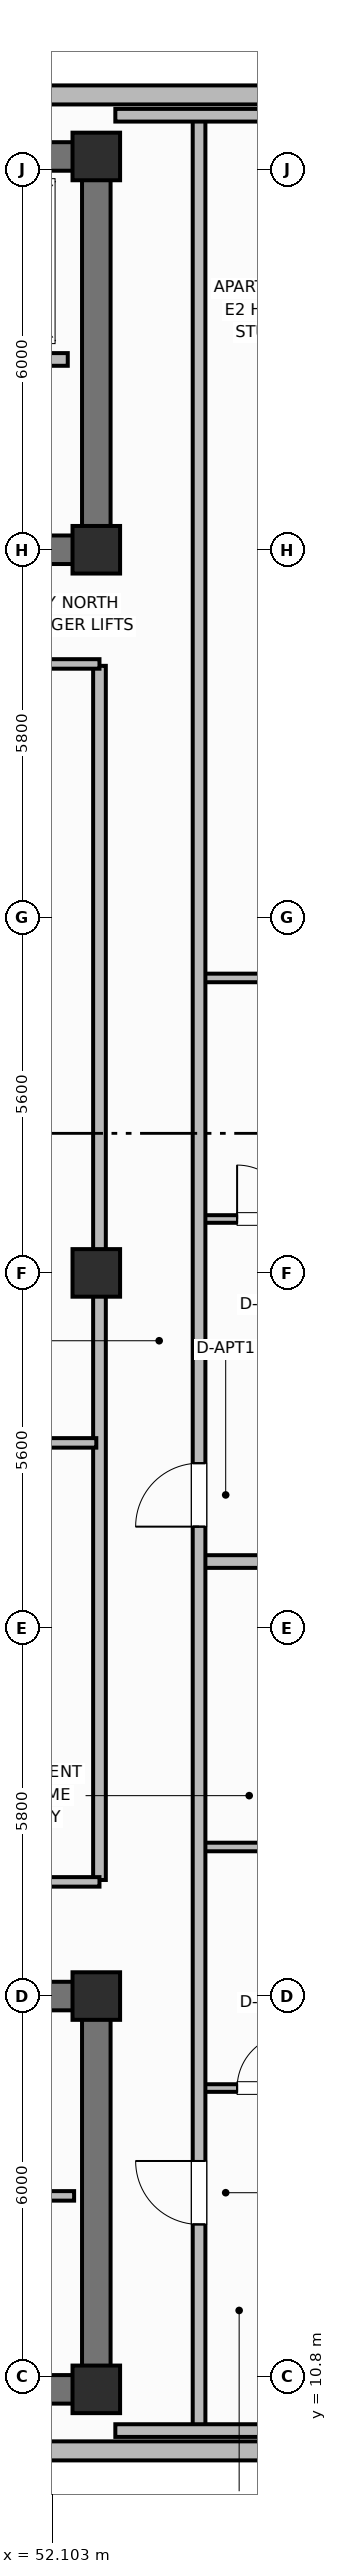
"""IFC4 building model, lengths in metres.
Left out: names, types, materials, properties, quantities, classifications, styles, units other than length and angle.
Written with IfcOpenShell. Run it as: python <this file> out.ifc"""

import sys

from ifc_helpers import new_model, si_unit, direction, frame, frame_2d, origin, origin_2d, place, context, subcontext, project, spatial, rectangle, extrude, element, fill, save


model = new_model("IFC4")
c1 = context("Model", 3, precision=1e-05, world=origin(), true_north=direction((0.0, 1.0)))
c2 = subcontext(c1, "Body", "Model", "MODEL_VIEW")
j1 = project(units=[si_unit("LENGTHUNIT", "METRE"), si_unit("PLANEANGLEUNIT", "RADIAN")], contexts=[c1])
p1 = place(None, origin())
s1 = spatial("IfcSite", under=j1, at=p1, CompositionType="ELEMENT")
p2 = place(p1, origin())
s2 = spatial("IfcBuilding", under=s1, at=p2, CompositionType="ELEMENT")
p3 = place(p2, frame((0.0, 0.0, 289.8)))
s3 = spatial("IfcBuildingStorey", under=s2, at=p3, CompositionType="ELEMENT", Elevation=289.8)
p4 = place(p3, frame((52.8, 10.6, 0.0), z_axis=(0.0, 0.0, 1.0), x_axis=(-1.0, 0.0, 0.0)))
e1 = element("IfcWall", 1, at=p4, inside=s3, PredefinedType="SHEAR", context=c2, shape_type="SweptSolid", body=[
    extrude(rectangle(XDim=27.2, YDim=0.45, at=frame_2d((13.6, 0.0))), origin(), (0.0, 0.0, 1.0), 3.7),
])
p5 = place(p3, frame((52.8, 10.825, 0.0), z_axis=(0.0, 0.0, 1.0), x_axis=(0.0, 1.0, 0.0)))
e2 = element("IfcWall", 2, at=p5, inside=s3, PredefinedType="SHEAR", context=c2, shape_type="SweptSolid", body=[
    extrude(rectangle(XDim=5.75, YDim=0.45, at=frame_2d((2.875, 0.0))), origin(), (0.0, 0.0, 1.0), 3.7),
])
p6 = place(p3, frame((25.6, 16.8, 0.0), z_axis=(0.0, 0.0, 1.0), x_axis=(1.0, 0.0, 0.0)))
e3 = element("IfcWall", 3, at=p6, inside=s3, PredefinedType="SHEAR", context=c2, shape_type="SweptSolid", body=[
    extrude(rectangle(XDim=27.2, YDim=0.45, at=frame_2d((13.6, 0.0))), origin(), (0.0, 0.0, 1.0), 3.7),
])
p7 = place(p6, frame((1.7, 0.0, 0.0)))
e4 = element("IfcOpeningElement", 4, at=p7, cuts=e3, PredefinedType="OPENING", context=c2, shape_type="SweptSolid", body=[
    extrude(rectangle(XDim=1.1, YDim=2.15, at=frame_2d((0.55, 1.075))), frame((0.0, 0.235, 0.0), z_axis=(0.0, -1.0, 0.0), x_axis=(1.0, 0.0, 0.0)), (0.0, 0.0, 1.0), 0.47),
])
p8 = place(p6, frame((4.45, 0.0, 0.0)))
e5 = element("IfcOpeningElement", 5, at=p8, cuts=e3, PredefinedType="OPENING", context=c2, shape_type="SweptSolid", body=[
    extrude(rectangle(XDim=0.85, YDim=2.1, at=frame_2d((0.425, 1.05))), frame((0.0, 0.235, 0.0), z_axis=(0.0, -1.0, 0.0), x_axis=(1.0, 0.0, 0.0)), (0.0, 0.0, 1.0), 0.47),
])
p9 = place(p6, frame((6.5, 0.0, 0.0)))
e6 = element("IfcOpeningElement", 6, at=p9, cuts=e3, PredefinedType="OPENING", context=c2, shape_type="SweptSolid", body=[
    extrude(rectangle(XDim=0.85, YDim=2.1, at=frame_2d((0.425, 1.05))), frame((0.0, 0.235, 0.0), z_axis=(0.0, -1.0, 0.0), x_axis=(1.0, 0.0, 0.0)), (0.0, 0.0, 1.0), 0.47),
])
p10 = place(p6, frame((13.0, 0.0, 0.0)))
e7 = element("IfcOpeningElement", 7, at=p10, cuts=e3, PredefinedType="OPENING", context=c2, shape_type="SweptSolid", body=[
    extrude(rectangle(XDim=1.2, YDim=2.15, at=frame_2d((0.6, 1.075))), frame((0.0, 0.235, 0.0), z_axis=(0.0, -1.0, 0.0), x_axis=(1.0, 0.0, 0.0)), (0.0, 0.0, 1.0), 0.47),
])
p11 = place(p6, frame((19.8, 0.0, 0.0)))
e8 = element("IfcOpeningElement", 8, at=p11, cuts=e3, PredefinedType="OPENING", context=c2, shape_type="SweptSolid", body=[
    extrude(rectangle(XDim=0.85, YDim=2.1, at=frame_2d((0.425, 1.05))), frame((0.0, 0.235, 0.0), z_axis=(0.0, -1.0, 0.0), x_axis=(1.0, 0.0, 0.0)), (0.0, 0.0, 1.0), 0.47),
])
p12 = place(p6, frame((24.2, 0.0, 0.0)))
e9 = element("IfcOpeningElement", 9, at=p12, cuts=e3, PredefinedType="OPENING", context=c2, shape_type="SweptSolid", body=[
    extrude(rectangle(XDim=0.85, YDim=2.1, at=frame_2d((0.425, 1.05))), frame((0.0, 0.235, 0.0), z_axis=(0.0, -1.0, 0.0), x_axis=(1.0, 0.0, 0.0)), (0.0, 0.0, 1.0), 0.47),
])
p13 = place(p3, frame((25.6, 45.8, 0.0), z_axis=(0.0, 0.0, 1.0), x_axis=(1.0, 0.0, 0.0)))
e10 = element("IfcWall", 10, at=p13, inside=s3, PredefinedType="SHEAR", context=c2, shape_type="SweptSolid", body=[
    extrude(rectangle(XDim=27.2, YDim=0.45, at=frame_2d((13.6, 0.0))), origin(), (0.0, 0.0, 1.0), 3.7),
])
p14 = place(p3, frame((52.8, 39.825, 0.0), z_axis=(0.0, 0.0, 1.0), x_axis=(0.0, 1.0, 0.0)))
e11 = element("IfcWall", 11, at=p14, inside=s3, PredefinedType="SHEAR", context=c2, shape_type="SweptSolid", body=[
    extrude(rectangle(XDim=5.75, YDim=0.45, at=frame_2d((2.875, 0.0))), origin(), (0.0, 0.0, 1.0), 3.7),
])
p15 = place(p3, frame((52.8, 39.6, 0.0), z_axis=(0.0, 0.0, 1.0), x_axis=(-1.0, 0.0, 0.0)))
e12 = element("IfcWall", 12, at=p15, inside=s3, PredefinedType="SHEAR", context=c2, shape_type="SweptSolid", body=[
    extrude(rectangle(XDim=27.2, YDim=0.45, at=frame_2d((13.6, 0.0))), origin(), (0.0, 0.0, 1.0), 3.7),
])
p16 = place(p15, frame((24.3, 0.0, 0.0)))
e13 = element("IfcOpeningElement", 13, at=p16, cuts=e12, PredefinedType="OPENING", context=c2, shape_type="SweptSolid", body=[
    extrude(rectangle(XDim=1.1, YDim=2.15, at=frame_2d((0.55, 1.075))), frame((0.0, 0.235, 0.0), z_axis=(0.0, -1.0, 0.0), x_axis=(1.0, 0.0, 0.0)), (0.0, 0.0, 1.0), 0.47),
])
p17 = place(p15, frame((21.85, 0.0, 0.0)))
e14 = element("IfcOpeningElement", 14, at=p17, cuts=e12, PredefinedType="OPENING", context=c2, shape_type="SweptSolid", body=[
    extrude(rectangle(XDim=0.85, YDim=2.1, at=frame_2d((0.425, 1.05))), frame((0.0, 0.235, 0.0), z_axis=(0.0, -1.0, 0.0), x_axis=(1.0, 0.0, 0.0)), (0.0, 0.0, 1.0), 0.47),
])
p18 = place(p15, frame((19.85, 0.0, 0.0)))
e15 = element("IfcOpeningElement", 15, at=p18, cuts=e12, PredefinedType="OPENING", context=c2, shape_type="SweptSolid", body=[
    extrude(rectangle(XDim=0.85, YDim=2.1, at=frame_2d((0.425, 1.05))), frame((0.0, 0.235, 0.0), z_axis=(0.0, -1.0, 0.0), x_axis=(1.0, 0.0, 0.0)), (0.0, 0.0, 1.0), 0.47),
])
p19 = place(p15, frame((15.1, 0.0, 0.0)))
e16 = element("IfcOpeningElement", 16, at=p19, cuts=e12, PredefinedType="OPENING", context=c2, shape_type="SweptSolid", body=[
    extrude(rectangle(XDim=1.2, YDim=2.15, at=frame_2d((0.6, 1.075))), frame((0.0, 0.235, 0.0), z_axis=(0.0, -1.0, 0.0), x_axis=(1.0, 0.0, 0.0)), (0.0, 0.0, 1.0), 0.47),
])
p20 = place(p15, frame((12.6, 0.0, 0.0)))
e17 = element("IfcOpeningElement", 17, at=p20, cuts=e12, PredefinedType="OPENING", context=c2, shape_type="SweptSolid", body=[
    extrude(rectangle(XDim=0.85, YDim=2.1, at=frame_2d((0.425, 1.05))), frame((0.0, 0.235, 0.0), z_axis=(0.0, -1.0, 0.0), x_axis=(1.0, 0.0, 0.0)), (0.0, 0.0, 1.0), 0.47),
])
p21 = place(p15, frame((10.85, 0.0, 0.0)))
e18 = element("IfcOpeningElement", 18, at=p21, cuts=e12, PredefinedType="OPENING", context=c2, shape_type="SweptSolid", body=[
    extrude(rectangle(XDim=0.85, YDim=2.1, at=frame_2d((0.425, 1.05))), frame((0.0, 0.235, 0.0), z_axis=(0.0, -1.0, 0.0), x_axis=(1.0, 0.0, 0.0)), (0.0, 0.0, 1.0), 0.47),
])
p22 = place(p15, frame((7.35, 0.0, 0.0)))
e19 = element("IfcOpeningElement", 19, at=p22, cuts=e12, PredefinedType="OPENING", context=c2, shape_type="SweptSolid", body=[
    extrude(rectangle(XDim=0.85, YDim=2.1, at=frame_2d((0.425, 1.05))), frame((0.0, 0.235, 0.0), z_axis=(0.0, -1.0, 0.0), x_axis=(1.0, 0.0, 0.0)), (0.0, 0.0, 1.0), 0.47),
])
p23 = place(p15, frame((4.2, 0.0, 0.0)))
e20 = element("IfcOpeningElement", 20, at=p23, cuts=e12, PredefinedType="OPENING", context=c2, shape_type="SweptSolid", body=[
    extrude(rectangle(XDim=1.3, YDim=2.2, at=frame_2d((0.65, 1.1))), frame((0.0, 0.235, 0.0), z_axis=(0.0, -1.0, 0.0), x_axis=(1.0, 0.0, 0.0)), (0.0, 0.0, 1.0), 0.47),
])
for number, where, z_axis, x_axis in (
    (21, (52.8, 10.6, 0.0), (0.0, 0.0, 1.0), (1.0, 0.0, 0.0)),
    (22, (52.8, 16.8, 0.0), (0.0, 0.0, 1.0), (1.0, 0.0, 0.0)),
    (23, (52.8, 39.6, 0.0), (0.0, 0.0, 1.0), (1.0, 0.0, 0.0)),
    (24, (52.8, 45.8, 0.0), (0.0, 0.0, 1.0), (1.0, 0.0, 0.0)),
    (25, (52.8, 28.2, 0.0), (0.0, 0.0, 1.0), (1.0, 0.0, 0.0)),
):
    element("IfcColumn", number, at=place(p3, frame(where, z_axis=z_axis, x_axis=x_axis)), inside=s3, PredefinedType="COLUMN", context=c2, shape_type="SweptSolid", body=[
        extrude(rectangle(XDim=0.75, YDim=0.75, at=origin_2d()), origin(), (0.0, 0.0, 1.0), 3.7),
    ])
p24 = place(p3, frame((30.21, 9.63, 0.0), z_axis=(0.0, 0.0, 1.0), x_axis=(1.0, 0.0, 0.0)))
e26 = element("IfcWall", 26, at=p24, inside=s3, PredefinedType="SOLIDWALL", context=c2, shape_type="SweptSolid", body=[
    extrude(rectangle(XDim=25.63, YDim=0.3, at=frame_2d((12.815, 0.0))), origin(), (0.0, 0.0, 1.0), 2.73),
])
p25 = place(p24, frame((1.452, 0.0, 0.95)))
e27 = element("IfcOpeningElement", 27, at=p25, cuts=e26, PredefinedType="OPENING", context=c2, shape_type="SweptSolid", body=[
    extrude(rectangle(XDim=1.1, YDim=1.65, at=frame_2d((0.55, 0.825))), frame((0.0, 0.16, 0.0), z_axis=(0.0, -1.0, 0.0), x_axis=(1.0, 0.0, 0.0)), (0.0, 0.0, 1.0), 0.32),
])
p26 = place(p24, frame((6.858, 0.0, 0.95)))
e28 = element("IfcOpeningElement", 28, at=p26, cuts=e26, PredefinedType="OPENING", context=c2, shape_type="SweptSolid", body=[
    extrude(rectangle(XDim=1.1, YDim=1.65, at=frame_2d((0.55, 0.825))), frame((0.0, 0.16, 0.0), z_axis=(0.0, -1.0, 0.0), x_axis=(1.0, 0.0, 0.0)), (0.0, 0.0, 1.0), 0.32),
])
p27 = place(p24, frame((9.562, 0.0, 0.95)))
e29 = element("IfcOpeningElement", 29, at=p27, cuts=e26, PredefinedType="OPENING", context=c2, shape_type="SweptSolid", body=[
    extrude(rectangle(XDim=1.1, YDim=1.65, at=frame_2d((0.55, 0.825))), frame((0.0, 0.16, 0.0), z_axis=(0.0, -1.0, 0.0), x_axis=(1.0, 0.0, 0.0)), (0.0, 0.0, 1.0), 0.32),
])
p28 = place(p24, frame((14.968, 0.0, 0.95)))
e30 = element("IfcOpeningElement", 30, at=p28, cuts=e26, PredefinedType="OPENING", context=c2, shape_type="SweptSolid", body=[
    extrude(rectangle(XDim=1.1, YDim=1.65, at=frame_2d((0.55, 0.825))), frame((0.0, 0.16, 0.0), z_axis=(0.0, -1.0, 0.0), x_axis=(1.0, 0.0, 0.0)), (0.0, 0.0, 1.0), 0.32),
])
p29 = place(p24, frame((17.672, 0.0, 0.95)))
e31 = element("IfcOpeningElement", 31, at=p29, cuts=e26, PredefinedType="OPENING", context=c2, shape_type="SweptSolid", body=[
    extrude(rectangle(XDim=1.1, YDim=1.65, at=frame_2d((0.55, 0.825))), frame((0.0, 0.16, 0.0), z_axis=(0.0, -1.0, 0.0), x_axis=(1.0, 0.0, 0.0)), (0.0, 0.0, 1.0), 0.32),
])
p30 = place(p24, frame((20.025, 0.0, 0.95)))
e32 = element("IfcOpeningElement", 32, at=p30, cuts=e26, PredefinedType="OPENING", context=c2, shape_type="SweptSolid", body=[
    extrude(rectangle(XDim=1.1, YDim=1.65, at=frame_2d((0.55, 0.825))), frame((0.0, 0.16, 0.0), z_axis=(0.0, -1.0, 0.0), x_axis=(1.0, 0.0, 0.0)), (0.0, 0.0, 1.0), 0.32),
])
p31 = place(p3, frame((55.84, 46.77, 0.0), z_axis=(0.0, 0.0, 1.0), x_axis=(-1.0, 0.0, 0.0)))
e33 = element("IfcWall", 33, at=p31, inside=s3, PredefinedType="SOLIDWALL", context=c2, shape_type="SweptSolid", body=[
    extrude(rectangle(XDim=4.45, YDim=0.3, at=frame_2d((2.225, 0.0))), origin(), (0.0, 0.0, 1.0), 2.73),
])
p32 = place(p3, frame((48.05, 13.65, 0.0), z_axis=(0.0, 0.0, 1.0), x_axis=(1.0, 0.0, 0.0)))
e34 = element("IfcWall", 34, at=p32, inside=s3, PredefinedType="PARTITIONING", context=c2, shape_type="SweptSolid", body=[
    extrude(rectangle(XDim=4.4, YDim=0.15, at=frame_2d((2.2, 0.0))), origin(), (0.0, 0.0, 1.0), 2.56),
])
p33 = place(p32, frame((1.6, 0.0, 0.0)))
e35 = element("IfcOpeningElement", 35, at=p33, cuts=e34, PredefinedType="OPENING", context=c2, shape_type="SweptSolid", body=[
    extrude(rectangle(XDim=0.85, YDim=2.1, at=frame_2d((0.425, 1.05))), frame((0.0, 0.085, 0.0), z_axis=(0.0, -1.0, 0.0), x_axis=(1.0, 0.0, 0.0)), (0.0, 0.0, 1.0), 0.17),
])
p34 = place(p3, frame((52.35, 42.6, 0.0), z_axis=(0.0, 0.0, 1.0), x_axis=(-1.0, 0.0, 0.0)))
e36 = element("IfcWall", 36, at=p34, inside=s3, PredefinedType="PARTITIONING", context=c2, shape_type="SweptSolid", body=[
    extrude(rectangle(XDim=6.5, YDim=0.2, at=frame_2d((3.25, 0.0))), origin(), (0.0, 0.0, 1.0), 2.56),
])
p35 = place(p34, frame((4.9, 0.0, 0.0)))
e37 = element("IfcOpeningElement", 37, at=p35, cuts=e36, PredefinedType="OPENING", context=c2, shape_type="SweptSolid", body=[
    extrude(rectangle(XDim=1.0, YDim=2.15, at=frame_2d((0.5, 1.075))), frame((0.0, 0.11, 0.0), z_axis=(0.0, -1.0, 0.0), x_axis=(1.0, 0.0, 0.0)), (0.0, 0.0, 1.0), 0.22),
])
p36 = place(p34, frame((2.8, 0.0, 0.0)))
e38 = element("IfcOpeningElement", 38, at=p36, cuts=e36, PredefinedType="OPENING", context=c2, shape_type="SweptSolid", body=[
    extrude(rectangle(XDim=1.0, YDim=2.15, at=frame_2d((0.5, 1.075))), frame((0.0, 0.11, 0.0), z_axis=(0.0, -1.0, 0.0), x_axis=(1.0, 0.0, 0.0)), (0.0, 0.0, 1.0), 0.22),
])
p37 = place(p34, frame((0.7, 0.0, 0.0)))
e39 = element("IfcOpeningElement", 39, at=p37, cuts=e36, PredefinedType="OPENING", context=c2, shape_type="SweptSolid", body=[
    extrude(rectangle(XDim=1.0, YDim=2.15, at=frame_2d((0.5, 1.075))), frame((0.0, 0.11, 0.0), z_axis=(0.0, -1.0, 0.0), x_axis=(1.0, 0.0, 0.0)), (0.0, 0.0, 1.0), 0.22),
])
p38 = place(p3, frame((52.85, 18.63, 0.0), z_axis=(0.0, 0.0, 1.0), x_axis=(0.0, 1.0, 0.0)))
e40 = element("IfcWall", 40, at=p38, inside=s3, PredefinedType="PARTITIONING", context=c2, shape_type="SweptSolid", body=[
    extrude(rectangle(XDim=19.14, YDim=0.2, at=frame_2d((9.57, 0.0))), origin(), (0.0, 0.0, 1.0), 2.56),
])
for number, where, z_axis, x_axis in (
    (41, (29.9, 18.6, 0.0), (0.0, 0.0, 1.0), (1.0, 0.0, 0.0)),
    (42, (29.9, 37.8, 0.0), (0.0, 0.0, 1.0), (1.0, 0.0, 0.0)),
):
    element("IfcWall", number, at=place(p3, frame(where, z_axis=z_axis, x_axis=x_axis)), inside=s3, PredefinedType="PARTITIONING", context=c2, shape_type="SweptSolid", body=[
        extrude(rectangle(XDim=22.95, YDim=0.15, at=frame_2d((11.475, 0.0))), origin(), (0.0, 0.0, 1.0), 2.56),
    ])
p39 = place(p3, frame((29.93, 25.521, 0.0), z_axis=(0.0, 0.0, 1.0), x_axis=(1.0, 0.0, 0.0)))
e43 = element("IfcWall", 43, at=p39, inside=s3, PredefinedType="PARTITIONING", context=c2, shape_type="SweptSolid", body=[
    extrude(rectangle(XDim=22.87, YDim=0.15, at=frame_2d((11.435, 0.0))), origin(), (0.0, 0.0, 1.0), 2.56),
])
p40 = place(p3, frame((54.42, 15.35, 0.0), z_axis=(0.0, 0.0, 1.0), x_axis=(1.0, 0.0, 0.0)))
e44 = element("IfcWall", 44, at=p40, inside=s3, PredefinedType="PARTITIONING", context=c2, shape_type="SweptSolid", body=[
    extrude(rectangle(XDim=1.95, YDim=0.12, at=frame_2d((0.975, 0.0))), origin(), (0.0, 0.0, 1.0), 2.56),
])
p41 = place(p40, frame((0.6, 0.0, 0.0)))
e45 = element("IfcOpeningElement", 45, at=p41, cuts=e44, PredefinedType="OPENING", context=c2, shape_type="SweptSolid", body=[
    extrude(rectangle(XDim=0.85, YDim=2.1, at=frame_2d((0.425, 1.05))), frame((0.0, 0.07, 0.0), z_axis=(0.0, -1.0, 0.0), x_axis=(1.0, 0.0, 0.0)), (0.0, 0.0, 1.0), 0.14),
])
p42 = place(p3, frame((54.42, 19.15, 0.0), z_axis=(0.0, 0.0, 1.0), x_axis=(1.0, 0.0, 0.0)))
e46 = element("IfcWall", 46, at=p42, inside=s3, PredefinedType="PARTITIONING", context=c2, shape_type="SweptSolid", body=[
    extrude(rectangle(XDim=1.95, YDim=0.135, at=frame_2d((0.975, 0.0))), origin(), (0.0, 0.0, 1.0), 2.56),
])
p43 = place(p3, frame((54.42, 23.65, 0.0), z_axis=(0.0, 0.0, 1.0), x_axis=(1.0, 0.0, 0.0)))
e47 = element("IfcWall", 47, at=p43, inside=s3, PredefinedType="PARTITIONING", context=c2, shape_type="SweptSolid", body=[
    extrude(rectangle(XDim=4.45, YDim=0.2, at=frame_2d((2.225, 0.0))), origin(), (0.0, 0.0, 1.0), 2.56),
])
p44 = place(p3, frame((54.42, 29.05, 0.0), z_axis=(0.0, 0.0, 1.0), x_axis=(1.0, 0.0, 0.0)))
e48 = element("IfcWall", 48, at=p44, inside=s3, PredefinedType="PARTITIONING", context=c2, shape_type="SweptSolid", body=[
    extrude(rectangle(XDim=1.95, YDim=0.12, at=frame_2d((0.975, 0.0))), origin(), (0.0, 0.0, 1.0), 2.56),
])
p45 = place(p44, frame((0.6, 0.0, 0.0)))
e49 = element("IfcOpeningElement", 49, at=p45, cuts=e48, PredefinedType="OPENING", context=c2, shape_type="SweptSolid", body=[
    extrude(rectangle(XDim=0.85, YDim=2.1, at=frame_2d((0.425, 1.05))), frame((0.0, 0.07, 0.0), z_axis=(0.0, -1.0, 0.0), x_axis=(1.0, 0.0, 0.0)), (0.0, 0.0, 1.0), 0.14),
])
p46 = place(p3, frame((54.42, 32.85, 0.0), z_axis=(0.0, 0.0, 1.0), x_axis=(1.0, 0.0, 0.0)))
e50 = element("IfcWall", 50, at=p46, inside=s3, PredefinedType="PARTITIONING", context=c2, shape_type="SweptSolid", body=[
    extrude(rectangle(XDim=1.95, YDim=0.135, at=frame_2d((0.975, 0.0))), origin(), (0.0, 0.0, 1.0), 2.56),
])
p47 = place(p3, frame((54.42, 9.95, 0.0), z_axis=(0.0, 0.0, 1.0), x_axis=(0.0, 1.0, 0.0)))
e51 = element("IfcWall", 51, at=p47, inside=s3, PredefinedType="PARTITIONING", context=c2, shape_type="SweptSolid", body=[
    extrude(rectangle(XDim=36.5, YDim=0.2, at=frame_2d((18.25, 0.0))), origin(), (0.0, 0.0, 1.0), 2.56),
])
p48 = place(p47, frame((3.25, 0.0, 0.0)))
e52 = element("IfcOpeningElement", 52, at=p48, cuts=e51, PredefinedType="OPENING", context=c2, shape_type="SweptSolid", body=[
    extrude(rectangle(XDim=1.0, YDim=2.15, at=frame_2d((0.5, 1.075))), frame((0.0, 0.11, 0.0), z_axis=(0.0, -1.0, 0.0), x_axis=(1.0, 0.0, 0.0)), (0.0, 0.0, 1.0), 0.22),
])
p49 = place(p47, frame((14.25, 0.0, 0.0)))
e53 = element("IfcOpeningElement", 53, at=p49, cuts=e51, PredefinedType="OPENING", context=c2, shape_type="SweptSolid", body=[
    extrude(rectangle(XDim=1.0, YDim=2.15, at=frame_2d((0.5, 1.075))), frame((0.0, 0.11, 0.0), z_axis=(0.0, -1.0, 0.0), x_axis=(1.0, 0.0, 0.0)), (0.0, 0.0, 1.0), 0.22),
])
for number, where, z_axis, x_axis in (
    (54, (53.1, 9.95, 0.0), (0.0, 0.0, 1.0), (1.0, 0.0, 0.0)),
    (55, (53.1, 46.45, 0.0), (0.0, 0.0, 1.0), (1.0, 0.0, 0.0)),
):
    element("IfcWall", number, at=place(p3, frame(where, z_axis=z_axis, x_axis=x_axis)), inside=s3, PredefinedType="PARTITIONING", context=c2, shape_type="SweptSolid", body=[
        extrude(rectangle(XDim=3.754, YDim=0.2, at=frame_2d((1.877, 0.0))), origin(), (0.0, 0.0, 1.0), 2.56),
    ])
p50 = place(p41, origin())
e56 = element("IfcDoor", 56, at=p50, inside=s3, OperationType="SINGLE_SWING_RIGHT", PredefinedType="DOOR", context=c2, shape_type="SweptSolid", body=[
    extrude(rectangle(XDim=0.85, YDim=2.1, at=frame_2d((0.425, 1.05))), frame((0.0, 0.025, 0.0), z_axis=(0.0, -1.0, 0.0), x_axis=(1.0, 0.0, 0.0)), (0.0, 0.0, 1.0), 0.05),
])
fill(e45, e56)
p51 = place(p45, origin())
e57 = element("IfcDoor", 57, at=p51, inside=s3, OperationType="SINGLE_SWING_LEFT", PredefinedType="DOOR", context=c2, shape_type="SweptSolid", body=[
    extrude(rectangle(XDim=0.85, YDim=2.1, at=frame_2d((0.425, 1.05))), frame((0.0, 0.025, 0.0), z_axis=(0.0, -1.0, 0.0), x_axis=(1.0, 0.0, 0.0)), (0.0, 0.0, 1.0), 0.05),
])
fill(e49, e57)
p52 = place(p48, origin())
e58 = element("IfcDoor", 58, at=p52, inside=s3, OperationType="SINGLE_SWING_RIGHT", PredefinedType="DOOR", context=c2, shape_type="SweptSolid", body=[
    extrude(rectangle(XDim=1.0, YDim=2.15, at=frame_2d((0.5, 1.075))), frame((0.0, 0.025, 0.0), z_axis=(0.0, -1.0, 0.0), x_axis=(1.0, 0.0, 0.0)), (0.0, 0.0, 1.0), 0.05),
])
fill(e52, e58)
p53 = place(p49, origin())
e59 = element("IfcDoor", 59, at=p53, inside=s3, OperationType="SINGLE_SWING_LEFT", PredefinedType="DOOR", context=c2, shape_type="SweptSolid", body=[
    extrude(rectangle(XDim=1.0, YDim=2.15, at=frame_2d((0.5, 1.075))), frame((0.0, 0.025, 0.0), z_axis=(0.0, -1.0, 0.0), x_axis=(1.0, 0.0, 0.0)), (0.0, 0.0, 1.0), 0.05),
])
fill(e53, e59)
save(model, sys.argv[1])
